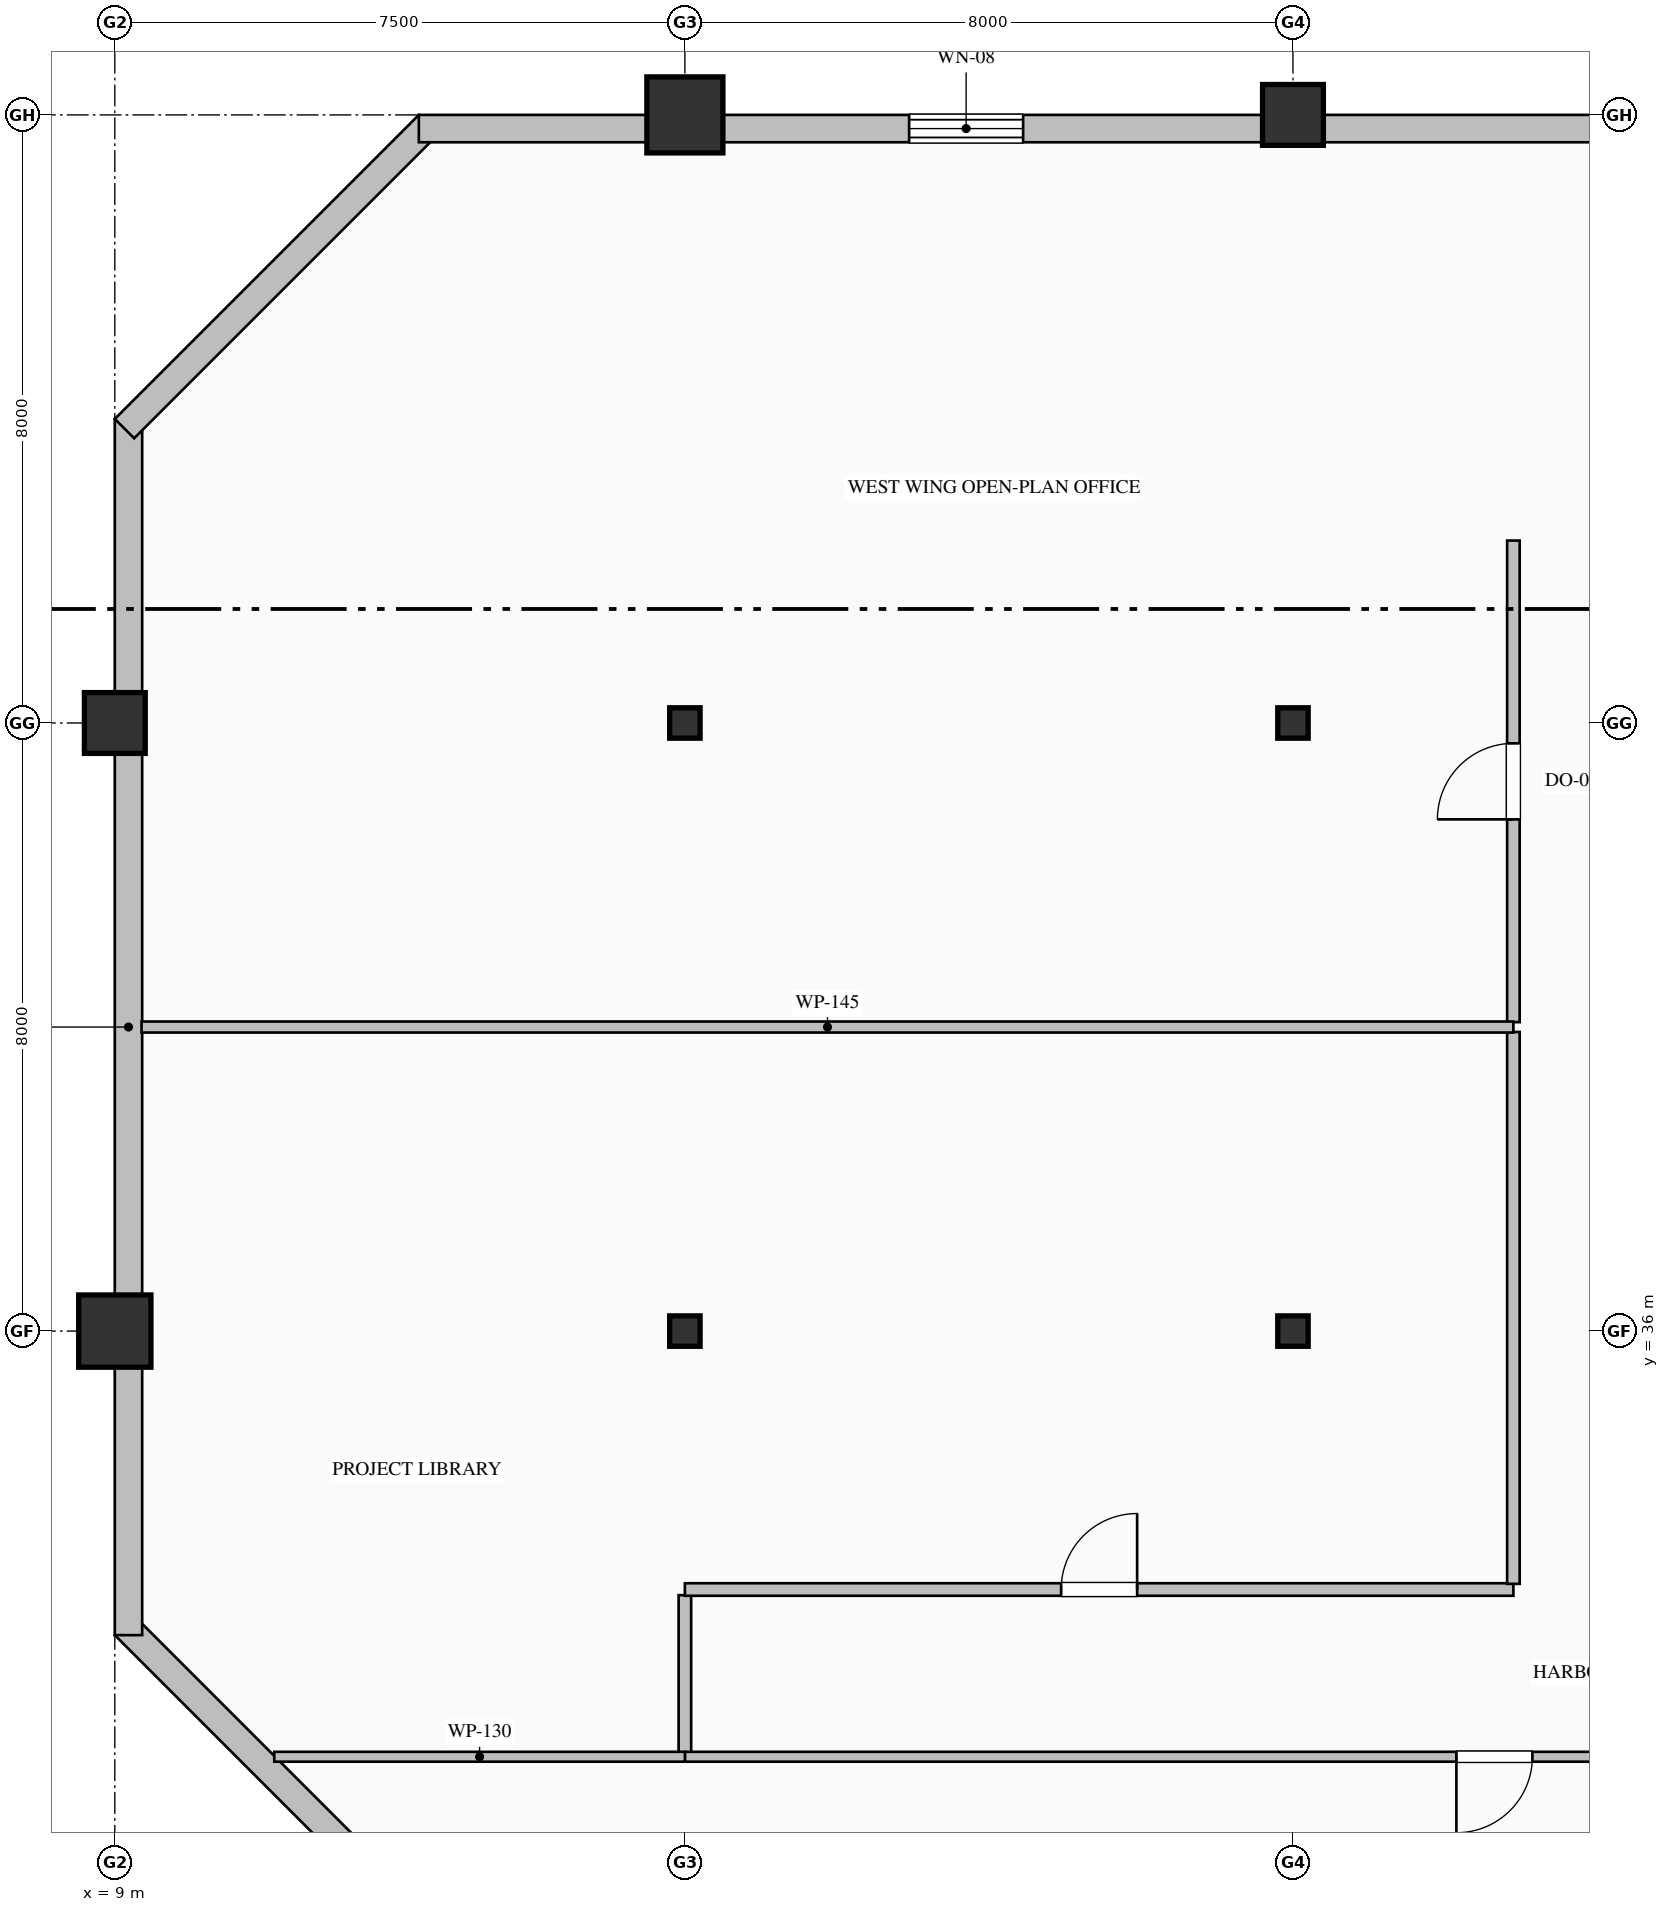
"""IFC4 building model, lengths in metres.
Left out: names, types, materials, properties, quantities, classifications, styles, units other than length and angle.
Written with IfcOpenShell. Run it as: python <this file> out.ifc"""

import sys

from ifc_helpers import new_model, si_unit, direction, frame, frame_2d, origin, origin_2d, place, context, subcontext, project, spatial, rectangle, hollow_rectangle, hollow_circle, i_section, extrude, element, fill, save


model = new_model("IFC4")
c1 = context("Model", 3, precision=1e-05, world=origin(), true_north=direction((0.0, 1.0)))
c2 = subcontext(c1, "Body", "Model", "MODEL_VIEW")
j1 = project(units=[si_unit("LENGTHUNIT", "METRE"), si_unit("PLANEANGLEUNIT", "RADIAN")], contexts=[c1])
p1 = place(None, origin())
s1 = spatial("IfcSite", under=j1, at=p1, CompositionType="ELEMENT")
p2 = place(p1, origin())
s2 = spatial("IfcBuilding", under=s1, at=p2, CompositionType="ELEMENT")
p3 = place(p2, frame((0.0, 0.0, 233.8)))
s3 = spatial("IfcBuildingStorey", under=s2, at=p3, CompositionType="ELEMENT", Elevation=233.8)
p4 = place(p3, frame((9.0, 36.0, 0.0), z_axis=(0.0, 0.0, 1.0), x_axis=(1.0, 0.0, 0.0)))
e1 = element("IfcColumn", 1, at=p4, inside=s3, PredefinedType="COLUMN", context=c2, shape_type="SweptSolid", body=[
    extrude(hollow_rectangle(XDim=0.95, YDim=0.95, WallThickness=0.036, at=origin_2d()), origin(), (0.0, 0.0, 1.0), 4.0),
])
p5 = place(p3, frame((9.0, 44.0, 0.0), z_axis=(0.0, 0.0, 1.0), x_axis=(1.0, 0.0, 0.0)))
e2 = element("IfcColumn", 2, at=p5, inside=s3, PredefinedType="COLUMN", context=c2, shape_type="SweptSolid", body=[
    extrude(hollow_rectangle(XDim=0.8, YDim=0.8, WallThickness=0.032, at=origin_2d()), origin(), (0.0, 0.0, 1.0), 4.0),
])
for number, where, z_axis, x_axis in (
    (3, (16.5, 36.0, 0.0), (0.0, 0.0, 1.0), (1.0, 0.0, 0.0)),
    (4, (16.5, 44.0, 0.0), (0.0, 0.0, 1.0), (1.0, 0.0, 0.0)),
):
    element("IfcColumn", number, at=place(p3, frame(where, z_axis=z_axis, x_axis=x_axis)), inside=s3, PredefinedType="COLUMN", context=c2, shape_type="SweptSolid", body=[
        extrude(i_section(OverallWidth=0.4, OverallDepth=0.4, WebThickness=0.013, FlangeThickness=0.021, FilletRadius=0.022, at=origin_2d()), origin(), (0.0, 0.0, 1.0), 4.0),
    ])
p6 = place(p3, frame((16.5, 52.0, 0.0), z_axis=(0.0, 0.0, 1.0), x_axis=(1.0, 0.0, 0.0)))
e5 = element("IfcColumn", 5, at=p6, inside=s3, PredefinedType="COLUMN", context=c2, shape_type="SweptSolid", body=[
    extrude(hollow_circle(Radius=0.5, WallThickness=0.036, at=origin_2d()), origin(), (0.0, 0.0, 1.0), 4.0),
])
for number, where, z_axis, x_axis in (
    (6, (24.5, 36.0, 0.0), (0.0, 0.0, 1.0), (1.0, 0.0, 0.0)),
    (7, (24.5, 44.0, 0.0), (0.0, 0.0, 1.0), (1.0, 0.0, 0.0)),
):
    element("IfcColumn", number, at=place(p3, frame(where, z_axis=z_axis, x_axis=x_axis)), inside=s3, PredefinedType="COLUMN", context=c2, shape_type="SweptSolid", body=[
        extrude(i_section(OverallWidth=0.4, OverallDepth=0.4, WebThickness=0.013, FlangeThickness=0.021, FilletRadius=0.022, at=origin_2d()), origin(), (0.0, 0.0, 1.0), 4.0),
    ])
p7 = place(p3, frame((24.5, 52.0, 0.0), z_axis=(0.0, 0.0, 1.0), x_axis=(1.0, 0.0, 0.0)))
e8 = element("IfcColumn", 8, at=p7, inside=s3, PredefinedType="COLUMN", context=c2, shape_type="SweptSolid", body=[
    extrude(hollow_rectangle(XDim=0.8, YDim=0.8, WallThickness=0.032, at=origin_2d()), origin(), (0.0, 0.0, 1.0), 4.0),
])
p8 = place(p3, frame((13.127, 28.127, 0.0), z_axis=(0.0, 0.0, 1.0), x_axis=(-0.707106781187, 0.707106781187, 0.0)))
e9 = element("IfcWall", 9, at=p8, inside=s3, PredefinedType="SOLIDWALL", context=c2, shape_type="SweptSolid", body=[
    extrude(rectangle(XDim=5.657, YDim=0.36, at=frame_2d((2.828, 0.0))), origin(), (0.0, 0.0, 1.0), 3.775),
])
p9 = place(p3, frame((9.18, 32.0, 0.0), z_axis=(0.0, 0.0, 1.0), x_axis=(0.0, 1.0, 0.0)))
e10 = element("IfcWall", 10, at=p9, inside=s3, PredefinedType="SOLIDWALL", context=c2, shape_type="SweptSolid", body=[
    extrude(rectangle(XDim=16.0, YDim=0.36, at=frame_2d((8.0, 0.0))), origin(), (0.0, 0.0, 1.0), 3.325),
])
p10 = place(p3, frame((9.127, 47.873, 0.0), z_axis=(0.0, 0.0, 1.0), x_axis=(0.707106781187, 0.707106781187, 0.0)))
e11 = element("IfcWall", 11, at=p10, inside=s3, PredefinedType="SOLIDWALL", context=c2, shape_type="SweptSolid", body=[
    extrude(rectangle(XDim=5.657, YDim=0.36, at=frame_2d((2.828, 0.0))), origin(), (0.0, 0.0, 1.0), 3.775),
])
p11 = place(p3, frame((13.0, 51.82, 0.0), z_axis=(0.0, 0.0, 1.0), x_axis=(1.0, 0.0, 0.0)))
e12 = element("IfcWall", 12, at=p11, inside=s3, PredefinedType="SOLIDWALL", context=c2, shape_type="SweptSolid", body=[
    extrude(rectangle(XDim=27.52, YDim=0.36, at=frame_2d((13.76, 0.0))), origin(), (0.0, 0.0, 1.0), 3.325),
])
p12 = place(p11, frame((6.45, 0.0, 0.7)))
e13 = element("IfcOpeningElement", 13, at=p12, cuts=e12, PredefinedType="OPENING", context=c2, shape_type="SweptSolid", body=[
    extrude(rectangle(XDim=1.5, YDim=2.4, at=frame_2d((0.75, 1.2))), frame((0.0, 0.19, 0.0), z_axis=(0.0, -1.0, 0.0), x_axis=(1.0, 0.0, 0.0)), (0.0, 0.0, 1.0), 0.38),
])
p13 = place(p3, frame((16.5, 30.457, 0.0), z_axis=(0.0, 0.0, 1.0), x_axis=(0.0, 1.0, 0.0)))
e14 = element("IfcWall", 14, at=p13, inside=s3, PredefinedType="PARTITIONING", context=c2, shape_type="SweptSolid", body=[
    extrude(rectangle(XDim=2.068, YDim=0.165, at=frame_2d((1.034, 0.0))), origin(), (0.0, 0.0, 1.0), 3.179),
])
p14 = place(p3, frame((16.5, 32.6, 0.0), z_axis=(0.0, 0.0, 1.0), x_axis=(1.0, 0.0, 0.0)))
e15 = element("IfcWall", 15, at=p14, inside=s3, PredefinedType="PARTITIONING", context=c2, shape_type="SweptSolid", body=[
    extrude(rectangle(XDim=10.9, YDim=0.165, at=frame_2d((5.45, 0.0))), origin(), (0.0, 0.0, 1.0), 3.775),
])
p15 = place(p14, frame((4.95, 0.0, 0.0)))
e16 = element("IfcOpeningElement", 16, at=p15, cuts=e15, PredefinedType="OPENING", context=c2, shape_type="SweptSolid", body=[
    extrude(rectangle(XDim=1.0, YDim=2.15, at=frame_2d((0.5, 1.075))), frame((0.0, 0.093, 0.0), z_axis=(0.0, -1.0, 0.0), x_axis=(1.0, 0.0, 0.0)), (0.0, 0.0, 1.0), 0.185),
])
p16 = place(p3, frame((37.8, 30.4, 0.0), z_axis=(0.0, 0.0, 1.0), x_axis=(-1.0, 0.0, 0.0)))
e17 = element("IfcWall", 17, at=p16, inside=s3, PredefinedType="PARTITIONING", context=c2, shape_type="SweptSolid", body=[
    extrude(rectangle(XDim=21.3, YDim=0.13, at=frame_2d((10.65, 0.0))), origin(), (0.0, 0.0, 1.0), 3.775),
])
p17 = place(p16, frame((10.15, 0.0, 0.0)))
e18 = element("IfcOpeningElement", 18, at=p17, cuts=e17, PredefinedType="OPENING", context=c2, shape_type="SweptSolid", body=[
    extrude(rectangle(XDim=1.0, YDim=2.15, at=frame_2d((0.5, 1.075))), frame((0.0, 0.075, 0.0), z_axis=(0.0, -1.0, 0.0), x_axis=(1.0, 0.0, 0.0)), (0.0, 0.0, 1.0), 0.15),
])
p18 = place(p3, frame((27.4, 40.064, 0.0), z_axis=(0.0, 0.0, 1.0), x_axis=(0.0, 1.0, 0.0)))
e19 = element("IfcWall", 19, at=p18, inside=s3, PredefinedType="PARTITIONING", context=c2, shape_type="SweptSolid", body=[
    extrude(rectangle(XDim=6.335, YDim=0.165, at=frame_2d((3.168, 0.0))), origin(), (0.0, 0.0, 1.0), 3.775),
])
p19 = place(p18, frame((2.668, 0.0, 0.0)))
e20 = element("IfcOpeningElement", 20, at=p19, cuts=e19, PredefinedType="OPENING", context=c2, shape_type="SweptSolid", body=[
    extrude(rectangle(XDim=1.0, YDim=2.15, at=frame_2d((0.5, 1.075))), frame((0.0, 0.093, 0.0), z_axis=(0.0, -1.0, 0.0), x_axis=(1.0, 0.0, 0.0)), (0.0, 0.0, 1.0), 0.185),
])
p20 = place(p3, frame((27.4, 32.675, 0.0), z_axis=(0.0, 0.0, 1.0), x_axis=(0.0, 1.0, 0.0)))
e21 = element("IfcWall", 21, at=p20, inside=s3, PredefinedType="PARTITIONING", context=c2, shape_type="SweptSolid", body=[
    extrude(rectangle(XDim=7.261, YDim=0.165, at=frame_2d((3.63, 0.0))), origin(), (0.0, 0.0, 1.0), 3.775),
])
p21 = place(p3, frame((27.4, 40.0, 0.0), z_axis=(0.0, 0.0, 1.0), x_axis=(-1.0, 0.0, 0.0)))
e22 = element("IfcWall", 22, at=p21, inside=s3, PredefinedType="PARTITIONING", context=c2, shape_type="SweptSolid", body=[
    extrude(rectangle(XDim=18.048, YDim=0.145, at=frame_2d((9.024, 0.0))), origin(), (0.0, 0.0, 1.0), 3.467),
])
p22 = place(p3, frame((16.5, 30.4, 0.0), z_axis=(0.0, 0.0, 1.0), x_axis=(-1.0, 0.0, 0.0)))
e23 = element("IfcWall", 23, at=p22, inside=s3, PredefinedType="PARTITIONING", context=c2, shape_type="SweptSolid", body=[
    extrude(rectangle(XDim=5.402, YDim=0.13, at=frame_2d((2.701, 0.0))), origin(), (0.0, 0.0, 1.0), 3.775),
])
p23 = place(p12, origin())
e24 = element("IfcWindow", 24, at=p23, inside=s3, PartitioningType="DOUBLE_PANEL_HORIZONTAL", PredefinedType="WINDOW", context=c2, shape_type="SweptSolid", body=[
    extrude(rectangle(XDim=1.5, YDim=2.4, at=frame_2d((0.75, 1.2))), frame((0.0, 0.15, 0.0), z_axis=(0.0, -1.0, 0.0), x_axis=(1.0, 0.0, 0.0)), (0.0, 0.0, 1.0), 0.06),
])
fill(e13, e24)
p24 = place(p19, origin())
e25 = element("IfcDoor", 25, at=p24, inside=s3, OperationType="SINGLE_SWING_LEFT", PredefinedType="DOOR", context=c2, shape_type="SweptSolid", body=[
    extrude(rectangle(XDim=1.0, YDim=2.15, at=frame_2d((0.5, 1.075))), frame((0.0, 0.025, 0.0), z_axis=(0.0, -1.0, 0.0), x_axis=(1.0, 0.0, 0.0)), (0.0, 0.0, 1.0), 0.05),
])
fill(e20, e25)
p25 = place(p15, origin())
e26 = element("IfcDoor", 26, at=p25, inside=s3, OperationType="SINGLE_SWING_RIGHT", PredefinedType="DOOR", context=c2, shape_type="SweptSolid", body=[
    extrude(rectangle(XDim=1.0, YDim=2.15, at=frame_2d((0.5, 1.075))), frame((0.0, 0.025, 0.0), z_axis=(0.0, -1.0, 0.0), x_axis=(1.0, 0.0, 0.0)), (0.0, 0.0, 1.0), 0.05),
])
fill(e16, e26)
p26 = place(p17, origin())
e27 = element("IfcDoor", 27, at=p26, inside=s3, OperationType="SINGLE_SWING_RIGHT", PredefinedType="DOOR", context=c2, shape_type="SweptSolid", body=[
    extrude(rectangle(XDim=1.0, YDim=2.15, at=frame_2d((0.5, 1.075))), frame((0.0, 0.025, 0.0), z_axis=(0.0, -1.0, 0.0), x_axis=(1.0, 0.0, 0.0)), (0.0, 0.0, 1.0), 0.05),
])
fill(e18, e27)
save(model, sys.argv[1])
